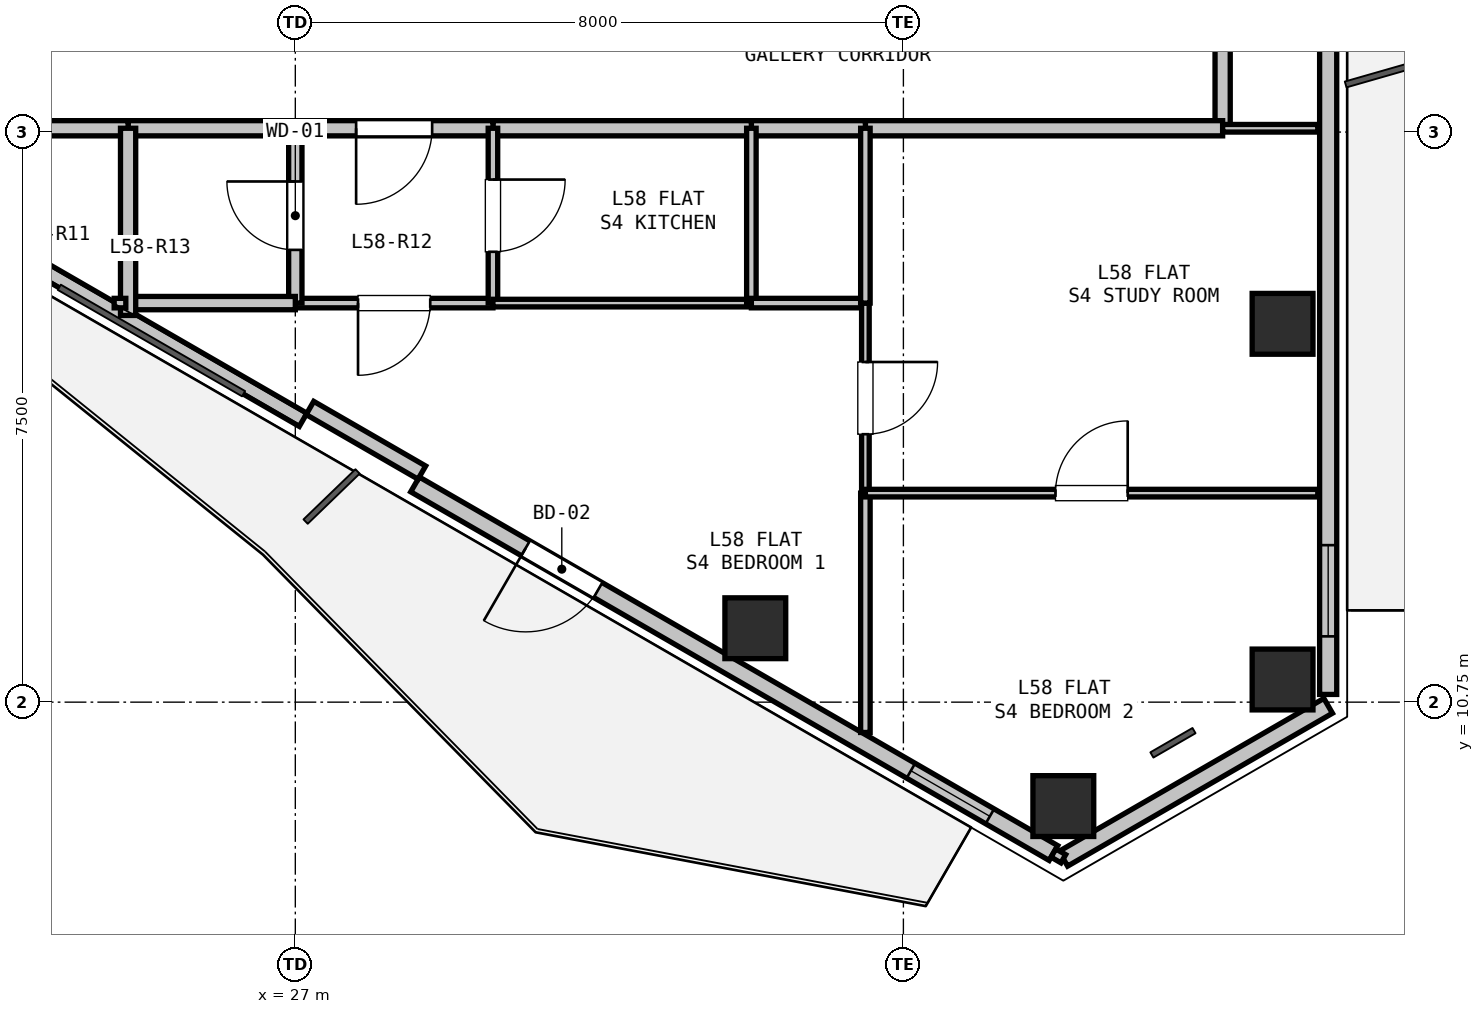
"""IFC4 building model, lengths in metres.
Left out: names, types, materials, properties, quantities, classifications, styles, units other than length and angle.
Written with IfcOpenShell. Run it as: python <this file> out.ifc"""

import sys

from ifc_helpers import new_model, si_unit, direction, frame, frame_2d, origin, origin_2d, place, context, subcontext, project, spatial, rectangle, hollow_rectangle, extrude, element, fill, save


model = new_model("IFC4")
c1 = context("Model", 3, precision=1e-05, world=origin(), true_north=direction((0.0, 1.0)))
c2 = subcontext(c1, "Body", "Model", "MODEL_VIEW")
j1 = project(units=[si_unit("LENGTHUNIT", "METRE"), si_unit("PLANEANGLEUNIT", "RADIAN")], contexts=[c1])
p1 = place(None, origin())
s1 = spatial("IfcSite", under=j1, at=p1, CompositionType="ELEMENT")
p2 = place(p1, origin())
s2 = spatial("IfcBuilding", under=s1, at=p2, CompositionType="ELEMENT")
p3 = place(p2, frame((0.0, 0.0, 208.5)))
s3 = spatial("IfcBuildingStorey", under=s2, at=p3, CompositionType="ELEMENT", Elevation=208.5)
for number, where, z_axis, x_axis in (
    (1, (39.988, 15.727, 0.0), (0.0, 0.0, 1.0), (1.0, 0.0, 0.0)),
    (2, (39.988, 11.048, 0.0), (0.0, 0.0, 1.0), (1.0, 0.0, 0.0)),
    (3, (37.104, 9.383, 0.0), (0.0, 0.0, 1.0), (1.0, 0.0, 0.0)),
    (4, (33.052, 11.722, 0.0), (0.0, 0.0, 1.0), (1.0, 0.0, 0.0)),
):
    element("IfcColumn", number, at=place(p3, frame(where, z_axis=z_axis, x_axis=x_axis)), inside=s3, PredefinedType="COLUMN", context=c2, shape_type="SweptSolid", body=[
        extrude(hollow_rectangle(XDim=0.8, YDim=0.8, WallThickness=0.025, at=origin_2d()), origin(), (0.0, 0.0, 1.0), 3.3),
    ])
p4 = place(p3, frame((40.588, 10.702, 0.0), z_axis=(0.0, 0.0, 1.0), x_axis=(-0.866023907196, -0.500002592159, 0.0)))
e5 = element("IfcWall", 5, at=p4, inside=s3, PredefinedType="SOLIDWALL", context=c2, shape_type="SweptSolid", body=[
    extrude(rectangle(XDim=4.023, YDim=0.225, at=frame_2d((2.012, 0.0))), origin(), (0.0, 0.0, 1.0), 2.69),
])
p5 = place(p3, frame((40.588, 20.551, 0.0), z_axis=(0.0, 0.0, 1.0), x_axis=(0.0, -1.0, 0.0)))
e6 = element("IfcWall", 6, at=p5, inside=s3, PredefinedType="SOLIDWALL", context=c2, shape_type="SweptSolid", body=[
    extrude(rectangle(XDim=9.699, YDim=0.225, at=frame_2d((4.85, 0.0))), origin(), (0.0, 0.0, 1.0), 2.69),
])
p6 = place(p5, frame((7.735, 0.0, 0.9)))
e7 = element("IfcOpeningElement", 7, at=p6, cuts=e6, PredefinedType="OPENING", context=c2, shape_type="SweptSolid", body=[
    extrude(rectangle(XDim=1.2, YDim=1.4, at=frame_2d((0.6, 0.7))), frame((0.0, 0.123, 0.0), z_axis=(0.0, -1.0, 0.0), x_axis=(1.0, 0.0, 0.0)), (0.0, 0.0, 1.0), 0.245),
])
p7 = place(p3, frame((36.974, 8.765, 0.0), z_axis=(0.0, 0.0, 1.0), x_axis=(-0.866016233231, 0.500015883528, 0.0)))
e8 = element("IfcWall", 8, at=p7, inside=s3, PredefinedType="SOLIDWALL", context=c2, shape_type="SweptSolid", body=[
    extrude(rectangle(XDim=9.699, YDim=0.225, at=frame_2d((4.85, 0.0))), origin(), (0.0, 0.0, 1.0), 2.69),
])
p8 = place(p7, frame((6.919, 0.0, 0.0)))
e9 = element("IfcOpeningElement", 9, at=p8, cuts=e8, PredefinedType="OPENING", context=c2, shape_type="SweptSolid", body=[
    extrude(rectangle(XDim=1.1, YDim=2.1, at=frame_2d((0.55, 1.05))), frame((0.0, 0.123, 0.0), z_axis=(0.0, -1.0, 0.0), x_axis=(1.0, 0.0, 0.0)), (0.0, 0.0, 1.0), 0.245),
])
p9 = place(p7, frame((0.966, 0.0, 0.9)))
e10 = element("IfcOpeningElement", 10, at=p9, cuts=e8, PredefinedType="OPENING", context=c2, shape_type="SweptSolid", body=[
    extrude(rectangle(XDim=1.2, YDim=1.4, at=frame_2d((0.6, 0.7))), frame((0.0, 0.123, 0.0), z_axis=(0.0, -1.0, 0.0), x_axis=(1.0, 0.0, 0.0)), (0.0, 0.0, 1.0), 0.245),
])
p10 = place(p3, frame((27.102, 14.464, 0.0), z_axis=(0.0, 0.0, 1.0), x_axis=(-0.866020680503, 0.500008180874, 0.0)))
e11 = element("IfcWall", 11, at=p10, inside=s3, PredefinedType="PARAPET", context=c2, shape_type="SweptSolid", body=[
    extrude(rectangle(XDim=8.999, YDim=0.2, at=frame_2d((4.5, 0.0))), origin(), (0.0, 0.0, 1.0), 0.2),
])
p11 = place(p3, frame((28.665, 13.77, 0.0), z_axis=(0.0, 0.0, 1.0), x_axis=(-0.866025371046, 0.500000056704, 0.0)))
e12 = element("IfcWall", 12, at=p11, inside=s3, PredefinedType="PARAPET", context=c2, shape_type="SweptSolid", body=[
    extrude(rectangle(XDim=1.7, YDim=0.2, at=frame_2d((0.85, 0.0))), origin(), (0.0, 0.0, 1.0), 2.69),
])
p12 = place(p3, frame((39.2, 19.9, 0.0), z_axis=(0.0, 0.0, 1.0), x_axis=(0.0, -1.0, 0.0)))
e13 = element("IfcWall", 13, at=p12, inside=s3, PredefinedType="PARTITIONING", context=c2, shape_type="SweptSolid", body=[
    extrude(rectangle(XDim=1.6, YDim=0.2, at=frame_2d((0.8, 0.0))), origin(), (0.0, 0.0, 1.0), 3.07),
])
p13 = place(p3, frame((39.2, 18.3, 0.0), z_axis=(0.0, 0.0, 1.0), x_axis=(-1.0, 0.0, 0.0)))
e14 = element("IfcWall", 14, at=p13, inside=s3, PredefinedType="PARTITIONING", context=c2, shape_type="SweptSolid", body=[
    extrude(rectangle(XDim=4.7, YDim=0.2, at=frame_2d((2.35, 0.0))), origin(), (0.0, 0.0, 1.0), 2.518),
])
p14 = place(p3, frame((34.5, 18.3, 0.0), z_axis=(0.0, 0.0, 1.0), x_axis=(-1.0, 0.0, 0.0)))
e15 = element("IfcWall", 15, at=p14, inside=s3, PredefinedType="PARTITIONING", context=c2, shape_type="SweptSolid", body=[
    extrude(rectangle(XDim=1.5, YDim=0.2, at=frame_2d((0.75, 0.0))), origin(), (0.0, 0.0, 1.0), 3.07),
])
p15 = place(p3, frame((33.0, 18.3, 0.0), z_axis=(0.0, 0.0, 1.0), x_axis=(-1.0, 0.0, 0.0)))
e16 = element("IfcWall", 16, at=p15, inside=s3, PredefinedType="PARTITIONING", context=c2, shape_type="SweptSolid", body=[
    extrude(rectangle(XDim=3.4, YDim=0.2, at=frame_2d((1.7, 0.0))), origin(), (0.0, 0.0, 1.0), 3.07),
])
p16 = place(p3, frame((29.6, 18.3, 0.0), z_axis=(0.0, 0.0, 1.0), x_axis=(-1.0, 0.0, 0.0)))
e17 = element("IfcWall", 17, at=p16, inside=s3, PredefinedType="PARTITIONING", context=c2, shape_type="SweptSolid", body=[
    extrude(rectangle(XDim=2.6, YDim=0.2, at=frame_2d((1.3, 0.0))), origin(), (0.0, 0.0, 1.0), 3.07),
])
p17 = place(p16, frame((0.8, 0.0, 0.0)))
e18 = element("IfcOpeningElement", 18, at=p17, cuts=e17, PredefinedType="OPENING", context=c2, shape_type="SweptSolid", body=[
    extrude(rectangle(XDim=1.0, YDim=2.15, at=frame_2d((0.5, 1.075))), frame((0.0, 0.11, 0.0), z_axis=(0.0, -1.0, 0.0), x_axis=(1.0, 0.0, 0.0)), (0.0, 0.0, 1.0), 0.22),
])
p18 = place(p3, frame((27.0, 18.3, 0.0), z_axis=(0.0, 0.0, 1.0), x_axis=(-1.0, 0.0, 0.0)))
e19 = element("IfcWall", 19, at=p18, inside=s3, PredefinedType="PARTITIONING", context=c2, shape_type="SweptSolid", body=[
    extrude(rectangle(XDim=2.2, YDim=0.2, at=frame_2d((1.1, 0.0))), origin(), (0.0, 0.0, 1.0), 2.518),
])
p19 = place(p3, frame((24.8, 18.3, 0.0), z_axis=(0.0, 0.0, 1.0), x_axis=(-1.0, 0.0, 0.0)))
e20 = element("IfcWall", 20, at=p19, inside=s3, PredefinedType="PARTITIONING", context=c2, shape_type="SweptSolid", body=[
    extrude(rectangle(XDim=3.2, YDim=0.2, at=frame_2d((1.6, 0.0))), origin(), (0.0, 0.0, 1.0), 2.365),
])
p20 = place(p19, frame((1.1, 0.0, 0.0)))
e21 = element("IfcOpeningElement", 21, at=p20, cuts=e20, PredefinedType="OPENING", context=c2, shape_type="SweptSolid", body=[
    extrude(rectangle(XDim=1.0, YDim=2.15, at=frame_2d((0.5, 1.075))), frame((0.0, 0.11, 0.0), z_axis=(0.0, -1.0, 0.0), x_axis=(1.0, 0.0, 0.0)), (0.0, 0.0, 1.0), 0.22),
])
p21 = place(p3, frame((29.6, 16.0, 0.0), z_axis=(0.0, 0.0, 1.0), x_axis=(-1.0, 0.0, 0.0)))
e22 = element("IfcWall", 22, at=p21, inside=s3, PredefinedType="PARTITIONING", context=c2, shape_type="SweptSolid", body=[
    extrude(rectangle(XDim=2.6, YDim=0.125, at=frame_2d((1.3, 0.0))), origin(), (0.0, 0.0, 1.0), 2.518),
])
p22 = place(p21, frame((0.825, 0.0, 0.0)))
e23 = element("IfcOpeningElement", 23, at=p22, cuts=e22, PredefinedType="OPENING", context=c2, shape_type="SweptSolid", body=[
    extrude(rectangle(XDim=0.95, YDim=2.1, at=frame_2d((0.475, 1.05))), frame((0.0, 0.073, 0.0), z_axis=(0.0, -1.0, 0.0), x_axis=(1.0, 0.0, 0.0)), (0.0, 0.0, 1.0), 0.145),
])
p23 = place(p3, frame((27.0, 16.0, 0.0), z_axis=(0.0, 0.0, 1.0), x_axis=(0.0, 1.0, 0.0)))
e24 = element("IfcWall", 24, at=p23, inside=s3, PredefinedType="PLUMBINGWALL", context=c2, shape_type="SweptSolid", body=[
    extrude(rectangle(XDim=2.3, YDim=0.175, at=frame_2d((1.15, 0.0))), origin(), (0.0, 0.0, 1.0), 2.518),
])
p24 = place(p23, frame((0.7, 0.0, 0.0)))
e25 = element("IfcOpeningElement", 25, at=p24, cuts=e24, PredefinedType="OPENING", context=c2, shape_type="SweptSolid", body=[
    extrude(rectangle(XDim=0.9, YDim=2.1, at=frame_2d((0.45, 1.05))), frame((0.0, 0.097, 0.0), z_axis=(0.0, -1.0, 0.0), x_axis=(1.0, 0.0, 0.0)), (0.0, 0.0, 1.0), 0.195),
])
p25 = place(p3, frame((29.6, 18.3, 0.0), z_axis=(0.0, 0.0, 1.0), x_axis=(0.0, -1.0, 0.0)))
e26 = element("IfcWall", 26, at=p25, inside=s3, PredefinedType="PARTITIONING", context=c2, shape_type="SweptSolid", body=[
    extrude(rectangle(XDim=2.3, YDim=0.125, at=frame_2d((1.15, 0.0))), origin(), (0.0, 0.0, 1.0), 3.07),
])
p26 = place(p25, frame((0.675, 0.0, 0.0)))
e27 = element("IfcOpeningElement", 27, at=p26, cuts=e26, PredefinedType="OPENING", context=c2, shape_type="SweptSolid", body=[
    extrude(rectangle(XDim=0.95, YDim=2.1, at=frame_2d((0.475, 1.05))), frame((0.0, 0.073, 0.0), z_axis=(0.0, -1.0, 0.0), x_axis=(1.0, 0.0, 0.0)), (0.0, 0.0, 1.0), 0.145),
])
p27 = place(p3, frame((27.0, 16.0, 0.0), z_axis=(0.0, 0.0, 1.0), x_axis=(-1.0, 0.0, 0.0)))
e28 = element("IfcWall", 28, at=p27, inside=s3, PredefinedType="PLUMBINGWALL", context=c2, shape_type="SweptSolid", body=[
    extrude(rectangle(XDim=2.2, YDim=0.175, at=frame_2d((1.1, 0.0))), origin(), (0.0, 0.0, 1.0), 2.365),
])
p28 = place(p3, frame((24.8, 15.838, 0.0), z_axis=(0.0, 0.0, 1.0), x_axis=(0.0, 1.0, 0.0)))
e29 = element("IfcWall", 29, at=p28, inside=s3, PredefinedType="PARTITIONING", context=c2, shape_type="SweptSolid", body=[
    extrude(rectangle(XDim=2.462, YDim=0.2, at=frame_2d((1.231, 0.0))), origin(), (0.0, 0.0, 1.0), 2.365),
])
p29 = place(p3, frame((33.0, 16.0, 0.0), z_axis=(0.0, 0.0, 1.0), x_axis=(-1.0, 0.0, 0.0)))
e30 = element("IfcWall", 30, at=p29, inside=s3, PredefinedType="PARTITIONING", context=c2, shape_type="SweptSolid", body=[
    extrude(rectangle(XDim=3.4, YDim=0.1, at=frame_2d((1.7, 0.0))), origin(), (0.0, 0.0, 1.0), 3.07),
])
p30 = place(p3, frame((33.0, 18.3, 0.0), z_axis=(0.0, 0.0, 1.0), x_axis=(0.0, -1.0, 0.0)))
e31 = element("IfcWall", 31, at=p30, inside=s3, PredefinedType="PARTITIONING", context=c2, shape_type="SweptSolid", body=[
    extrude(rectangle(XDim=2.3, YDim=0.125, at=frame_2d((1.15, 0.0))), origin(), (0.0, 0.0, 1.0), 3.07),
])
p31 = place(p3, frame((24.77, 16.0, 0.0), z_axis=(0.0, 0.0, 1.0), x_axis=(-1.0, 0.0, 0.0)))
e32 = element("IfcWall", 32, at=p31, inside=s3, PredefinedType="PARTITIONING", context=c2, shape_type="SweptSolid", body=[
    extrude(rectangle(XDim=0.153, YDim=0.125, at=frame_2d((0.077, 0.0))), origin(), (0.0, 0.0, 1.0), 3.07),
])
p32 = place(p3, frame((33.0, 16.0, 0.0), z_axis=(0.0, 0.0, 1.0), x_axis=(1.0, 0.0, 0.0)))
e33 = element("IfcWall", 33, at=p32, inside=s3, PredefinedType="PARTITIONING", context=c2, shape_type="SweptSolid", body=[
    extrude(rectangle(XDim=1.5, YDim=0.125, at=frame_2d((0.75, 0.0))), origin(), (0.0, 0.0, 1.0), 3.07),
])
p33 = place(p3, frame((34.5, 16.0, 0.0), z_axis=(0.0, 0.0, 1.0), x_axis=(0.0, -1.0, 0.0)))
e34 = element("IfcWall", 34, at=p33, inside=s3, PredefinedType="PARTITIONING", context=c2, shape_type="SweptSolid", body=[
    extrude(rectangle(XDim=2.5, YDim=0.1, at=frame_2d((1.25, 0.0))), origin(), (0.0, 0.0, 1.0), 3.07),
])
p34 = place(p33, frame((0.775, 0.0, 0.0)))
e35 = element("IfcOpeningElement", 35, at=p34, cuts=e34, PredefinedType="OPENING", context=c2, shape_type="SweptSolid", body=[
    extrude(rectangle(XDim=0.95, YDim=2.1, at=frame_2d((0.475, 1.05))), frame((0.0, 0.06, 0.0), z_axis=(0.0, -1.0, 0.0), x_axis=(1.0, 0.0, 0.0)), (0.0, 0.0, 1.0), 0.12),
])
p35 = place(p3, frame((34.5, 13.5, 0.0), z_axis=(0.0, 0.0, 1.0), x_axis=(0.0, -1.0, 0.0)))
e36 = element("IfcWall", 36, at=p35, inside=s3, PredefinedType="PARTITIONING", context=c2, shape_type="SweptSolid", body=[
    extrude(rectangle(XDim=3.149, YDim=0.125, at=frame_2d((1.574, 0.0))), origin(), (0.0, 0.0, 1.0), 2.795),
])
p36 = place(p3, frame((34.5, 13.5, 0.0), z_axis=(0.0, 0.0, 1.0), x_axis=(1.0, 0.0, 0.0)))
e37 = element("IfcWall", 37, at=p36, inside=s3, PredefinedType="PARTITIONING", context=c2, shape_type="SweptSolid", body=[
    extrude(rectangle(XDim=5.952, YDim=0.1, at=frame_2d((2.976, 0.0))), origin(), (0.0, 0.0, 1.0), 2.518),
])
p37 = place(p36, frame((2.501, 0.0, 0.0)))
e38 = element("IfcOpeningElement", 38, at=p37, cuts=e37, PredefinedType="OPENING", context=c2, shape_type="SweptSolid", body=[
    extrude(rectangle(XDim=0.95, YDim=2.1, at=frame_2d((0.475, 1.05))), frame((0.0, 0.06, 0.0), z_axis=(0.0, -1.0, 0.0), x_axis=(1.0, 0.0, 0.0)), (0.0, 0.0, 1.0), 0.12),
])
p38 = place(p3, frame((37.104, 8.69, 0.0), z_axis=(0.0, 0.0, 1.0), x_axis=(-0.866131372301, 0.499816412211, 0.0)))
e39 = element("IfcWall", 39, at=p38, inside=s3, PredefinedType="PARTITIONING", context=c2, shape_type="SweptSolid", body=[
    extrude(rectangle(XDim=0.15, YDim=0.125, at=frame_2d((0.075, 0.0))), origin(), (0.0, 0.0, 1.0), 3.07),
])
p39 = place(p3, frame((39.2, 18.3, 0.0), z_axis=(0.0, 0.0, 1.0), x_axis=(1.0, 0.0, 0.0)))
e40 = element("IfcWall", 40, at=p39, inside=s3, PredefinedType="PARTITIONING", context=c2, shape_type="SweptSolid", body=[
    extrude(rectangle(XDim=1.252, YDim=0.1, at=frame_2d((0.626, 0.0))), origin(), (0.0, 0.0, 1.0), 2.365),
])
p40 = place(p3, frame((34.5, 16.0, 0.0), z_axis=(0.0, 0.0, 1.0), x_axis=(0.0, 1.0, 0.0)))
e41 = element("IfcWall", 41, at=p40, inside=s3, PredefinedType="PARTITIONING", context=c2, shape_type="SweptSolid", body=[
    extrude(rectangle(XDim=2.3, YDim=0.125, at=frame_2d((1.15, 0.0))), origin(), (0.0, 0.0, 1.0), 3.07),
])
p41 = place(p6, origin())
e42 = element("IfcWindow", 42, at=p41, inside=s3, PartitioningType="SINGLE_PANEL", PredefinedType="WINDOW", context=c2, shape_type="SweptSolid", body=[
    extrude(rectangle(XDim=1.2, YDim=1.4, at=frame_2d((0.6, 0.7))), frame((0.0, 0.03, 0.0), z_axis=(0.0, -1.0, 0.0), x_axis=(1.0, 0.0, 0.0)), (0.0, 0.0, 1.0), 0.06),
])
fill(e7, e42)
p42 = place(p8, origin())
e43 = element("IfcDoor", 43, at=p42, inside=s3, OperationType="SINGLE_SWING_RIGHT", PredefinedType="DOOR", context=c2, shape_type="SweptSolid", body=[
    extrude(rectangle(XDim=1.1, YDim=2.1, at=frame_2d((0.55, 1.05))), frame((0.0, 0.025, 0.0), z_axis=(0.0, -1.0, 0.0), x_axis=(1.0, 0.0, 0.0)), (0.0, 0.0, 1.0), 0.05),
])
fill(e9, e43)
p43 = place(p9, origin())
e44 = element("IfcWindow", 44, at=p43, inside=s3, PartitioningType="SINGLE_PANEL", PredefinedType="WINDOW", context=c2, shape_type="SweptSolid", body=[
    extrude(rectangle(XDim=1.2, YDim=1.4, at=frame_2d((0.6, 0.7))), frame((0.0, 0.03, 0.0), z_axis=(0.0, -1.0, 0.0), x_axis=(1.0, 0.0, 0.0)), (0.0, 0.0, 1.0), 0.06),
])
fill(e10, e44)
p44 = place(p17, origin())
e45 = element("IfcDoor", 45, at=p44, inside=s3, OperationType="SINGLE_SWING_RIGHT", PredefinedType="DOOR", context=c2, shape_type="SweptSolid", body=[
    extrude(rectangle(XDim=1.0, YDim=2.15, at=frame_2d((0.5, 1.075))), frame((0.0, 0.025, 0.0), z_axis=(0.0, -1.0, 0.0), x_axis=(1.0, 0.0, 0.0)), (0.0, 0.0, 1.0), 0.05),
])
fill(e18, e45)
p45 = place(p24, origin())
e46 = element("IfcDoor", 46, at=p45, inside=s3, OperationType="SINGLE_SWING_RIGHT", PredefinedType="DOOR", context=c2, shape_type="SweptSolid", body=[
    extrude(rectangle(XDim=0.9, YDim=2.1, at=frame_2d((0.45, 1.05))), frame((0.0, 0.025, 0.0), z_axis=(0.0, -1.0, 0.0), x_axis=(1.0, 0.0, 0.0)), (0.0, 0.0, 1.0), 0.05),
])
fill(e25, e46)
p46 = place(p26, origin())
e47 = element("IfcDoor", 47, at=p46, inside=s3, OperationType="SINGLE_SWING_LEFT", PredefinedType="DOOR", context=c2, shape_type="SweptSolid", body=[
    extrude(rectangle(XDim=0.95, YDim=2.1, at=frame_2d((0.475, 1.05))), frame((0.0, 0.025, 0.0), z_axis=(0.0, -1.0, 0.0), x_axis=(1.0, 0.0, 0.0)), (0.0, 0.0, 1.0), 0.05),
])
fill(e27, e47)
p47 = place(p22, origin())
e48 = element("IfcDoor", 48, at=p47, inside=s3, OperationType="SINGLE_SWING_RIGHT", PredefinedType="DOOR", context=c2, shape_type="SweptSolid", body=[
    extrude(rectangle(XDim=0.95, YDim=2.1, at=frame_2d((0.475, 1.05))), frame((0.0, 0.025, 0.0), z_axis=(0.0, -1.0, 0.0), x_axis=(1.0, 0.0, 0.0)), (0.0, 0.0, 1.0), 0.05),
])
fill(e23, e48)
p48 = place(p34, origin())
e49 = element("IfcDoor", 49, at=p48, inside=s3, OperationType="SINGLE_SWING_LEFT", PredefinedType="DOOR", context=c2, shape_type="SweptSolid", body=[
    extrude(rectangle(XDim=0.95, YDim=2.1, at=frame_2d((0.475, 1.05))), frame((0.0, 0.025, 0.0), z_axis=(0.0, -1.0, 0.0), x_axis=(1.0, 0.0, 0.0)), (0.0, 0.0, 1.0), 0.05),
])
fill(e35, e49)
p49 = place(p37, origin())
e50 = element("IfcDoor", 50, at=p49, inside=s3, OperationType="SINGLE_SWING_RIGHT", PredefinedType="DOOR", context=c2, shape_type="SweptSolid", body=[
    extrude(rectangle(XDim=0.95, YDim=2.1, at=frame_2d((0.475, 1.05))), frame((0.0, 0.025, 0.0), z_axis=(0.0, -1.0, 0.0), x_axis=(1.0, 0.0, 0.0)), (0.0, 0.0, 1.0), 0.05),
])
fill(e38, e50)
save(model, sys.argv[1])
